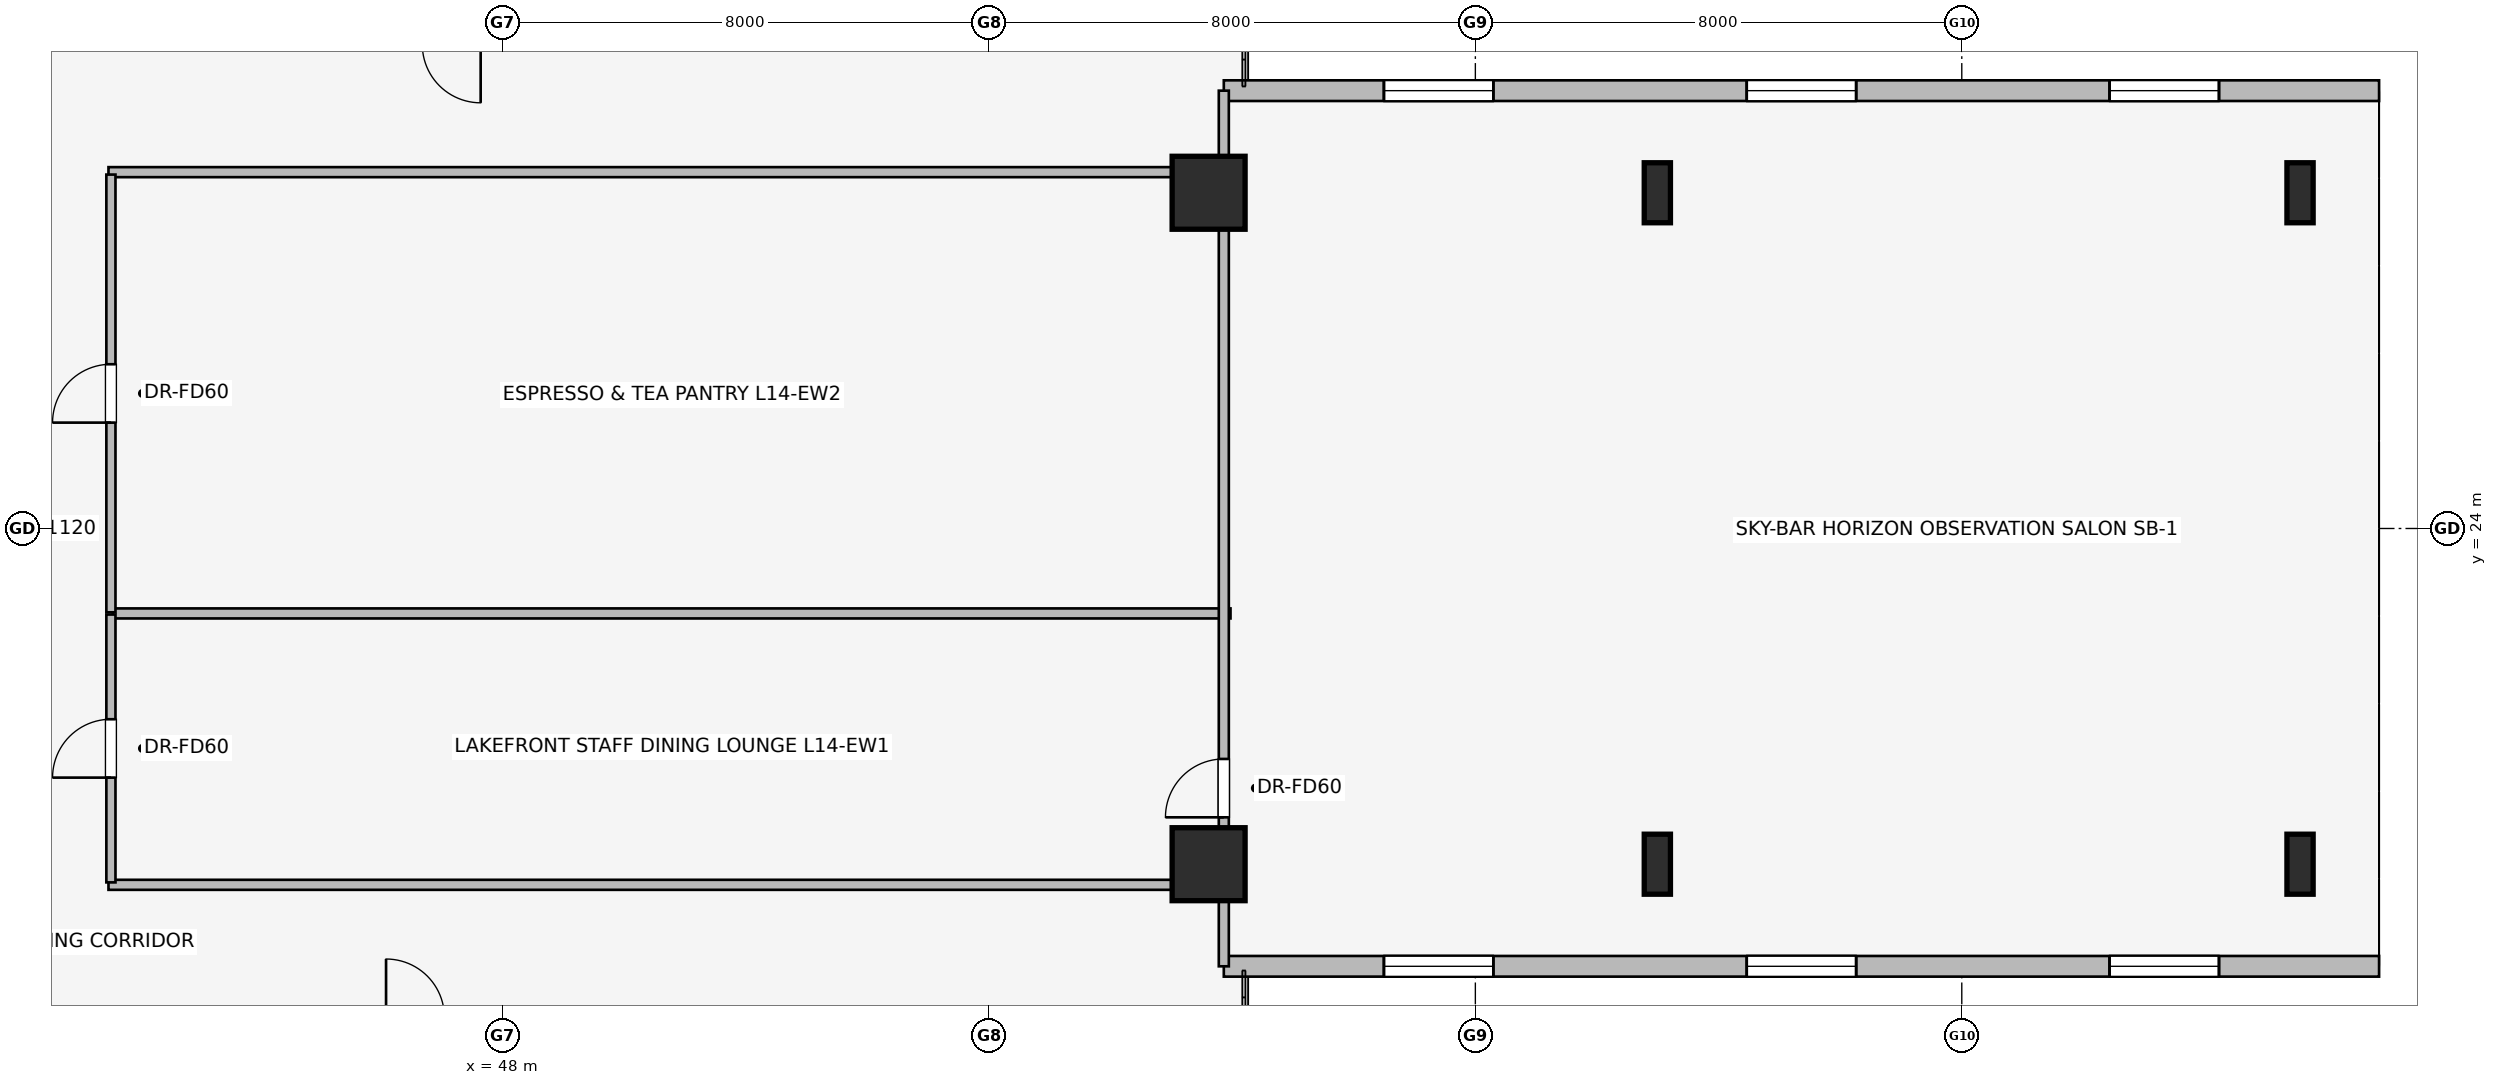
"""IFC4 building model, lengths in metres.
Left out: names, types, materials, properties, quantities, classifications, styles, units other than length and angle.
Written with IfcOpenShell. Run it as: python <this file> out.ifc"""

import sys

from ifc_helpers import new_model, si_unit, direction, frame, frame_2d, origin, origin_2d, place, context, subcontext, project, spatial, rectangle, i_section, extrude, element, fill, save


model = new_model("IFC4")
c1 = context("Model", 3, precision=1e-05, world=origin(), true_north=direction((0.0, 1.0)))
c2 = subcontext(c1, "Body", "Model", "MODEL_VIEW")
j1 = project(units=[si_unit("LENGTHUNIT", "METRE"), si_unit("PLANEANGLEUNIT", "RADIAN")], contexts=[c1])
p1 = place(None, origin())
s1 = spatial("IfcSite", under=j1, at=p1, CompositionType="ELEMENT")
p2 = place(p1, origin())
s2 = spatial("IfcBuilding", under=s1, at=p2, CompositionType="ELEMENT")
p3 = place(p2, frame((0.0, 0.0, 56.2)))
s3 = spatial("IfcBuildingStorey", under=s2, at=p3, CompositionType="ELEMENT", Elevation=56.2)
for number, where, z_axis, x_axis in (
    (1, (59.613, 18.479, 0.0), (0.0, 0.0, 1.0), (1.0, 0.0, 0.0)),
    (2, (59.613, 29.521, 0.0), (0.0, 0.0, 1.0), (1.0, 0.0, 0.0)),
):
    element("IfcColumn", number, at=place(p3, frame(where, z_axis=z_axis, x_axis=x_axis)), inside=s3, PredefinedType="COLUMN", context=c2, shape_type="SweptSolid", body=[
        extrude(rectangle(XDim=1.2, YDim=1.2, at=origin_2d()), origin(), (0.0, 0.0, 1.0), 3.65),
    ])
for number, where, z_axis, x_axis in (
    (3, (66.993, 18.479, 0.0), (0.0, 0.0, 1.0), (1.0, 0.0, 0.0)),
    (4, (66.993, 29.521, 0.0), (0.0, 0.0, 1.0), (1.0, 0.0, 0.0)),
    (5, (77.563, 18.479, 0.0), (0.0, 0.0, 1.0), (1.0, 0.0, 0.0)),
    (6, (77.563, 29.521, 0.0), (0.0, 0.0, 1.0), (1.0, 0.0, 0.0)),
):
    element("IfcColumn", number, at=place(p3, frame(where, z_axis=z_axis, x_axis=x_axis)), inside=s3, PredefinedType="COLUMN", context=c2, shape_type="SweptSolid", body=[
        extrude(i_section(OverallWidth=0.431, OverallDepth=0.987, WebThickness=0.034, FlangeThickness=0.062, at=origin_2d()), origin(), (0.0, 0.0, 1.0), 3.65),
    ])
p4 = place(p3, frame((78.863, 16.8, 0.0), z_axis=(0.0, 0.0, 1.0), x_axis=(-1.0, 0.0, 0.0)))
e7 = element("IfcWall", 7, at=p4, inside=s3, PredefinedType="STANDARD", context=c2, shape_type="SweptSolid", body=[
    extrude(rectangle(XDim=19.0, YDim=0.34, at=frame_2d((9.5, 0.0))), origin(), (0.0, 0.0, 1.0), 3.36),
])
p5 = place(p4, frame((2.633, 0.0, 0.75)))
e8 = element("IfcOpeningElement", 8, at=p5, cuts=e7, PredefinedType="OPENING", context=c2, shape_type="SweptSolid", body=[
    extrude(rectangle(XDim=1.8, YDim=1.5, at=frame_2d((0.9, 0.75))), frame((0.0, 0.18, 0.0), z_axis=(0.0, -1.0, 0.0), x_axis=(1.0, 0.0, 0.0)), (0.0, 0.0, 1.0), 0.36),
])
p6 = place(p4, frame((8.6, 0.0, 0.75)))
e9 = element("IfcOpeningElement", 9, at=p6, cuts=e7, PredefinedType="OPENING", context=c2, shape_type="SweptSolid", body=[
    extrude(rectangle(XDim=1.8, YDim=1.5, at=frame_2d((0.9, 0.75))), frame((0.0, 0.18, 0.0), z_axis=(0.0, -1.0, 0.0), x_axis=(1.0, 0.0, 0.0)), (0.0, 0.0, 1.0), 0.36),
])
p7 = place(p4, frame((14.567, 0.0, 0.75)))
e10 = element("IfcOpeningElement", 10, at=p7, cuts=e7, PredefinedType="OPENING", context=c2, shape_type="SweptSolid", body=[
    extrude(rectangle(XDim=1.8, YDim=1.5, at=frame_2d((0.9, 0.75))), frame((0.0, 0.18, 0.0), z_axis=(0.0, -1.0, 0.0), x_axis=(1.0, 0.0, 0.0)), (0.0, 0.0, 1.0), 0.36),
])
p8 = place(p3, frame((59.863, 31.2, 0.0), z_axis=(0.0, 0.0, 1.0), x_axis=(1.0, 0.0, 0.0)))
e11 = element("IfcWall", 11, at=p8, inside=s3, PredefinedType="STANDARD", context=c2, shape_type="SweptSolid", body=[
    extrude(rectangle(XDim=19.0, YDim=0.34, at=frame_2d((9.5, 0.0))), origin(), (0.0, 0.0, 1.0), 3.36),
])
p9 = place(p8, frame((2.633, 0.0, 0.75)))
e12 = element("IfcOpeningElement", 12, at=p9, cuts=e11, PredefinedType="OPENING", context=c2, shape_type="SweptSolid", body=[
    extrude(rectangle(XDim=1.8, YDim=1.5, at=frame_2d((0.9, 0.75))), frame((0.0, 0.18, 0.0), z_axis=(0.0, -1.0, 0.0), x_axis=(1.0, 0.0, 0.0)), (0.0, 0.0, 1.0), 0.36),
])
p10 = place(p8, frame((8.6, 0.0, 0.75)))
e13 = element("IfcOpeningElement", 13, at=p10, cuts=e11, PredefinedType="OPENING", context=c2, shape_type="SweptSolid", body=[
    extrude(rectangle(XDim=1.8, YDim=1.5, at=frame_2d((0.9, 0.75))), frame((0.0, 0.18, 0.0), z_axis=(0.0, -1.0, 0.0), x_axis=(1.0, 0.0, 0.0)), (0.0, 0.0, 1.0), 0.36),
])
p11 = place(p8, frame((14.567, 0.0, 0.75)))
e14 = element("IfcOpeningElement", 14, at=p11, cuts=e11, PredefinedType="OPENING", context=c2, shape_type="SweptSolid", body=[
    extrude(rectangle(XDim=1.8, YDim=1.5, at=frame_2d((0.9, 0.75))), frame((0.0, 0.18, 0.0), z_axis=(0.0, -1.0, 0.0), x_axis=(1.0, 0.0, 0.0)), (0.0, 0.0, 1.0), 0.36),
])
for number, where, z_axis, x_axis in (
    (15, (41.52, 18.14, 0.0), (0.0, 0.0, 1.0), (1.0, 0.0, 0.0)),
    (16, (41.52, 29.86, 0.0), (0.0, 0.0, 1.0), (1.0, 0.0, 0.0)),
):
    element("IfcWall", number, at=place(p3, frame(where, z_axis=z_axis, x_axis=x_axis)), inside=s3, PredefinedType="PARTITIONING", context=c2, shape_type="SweptSolid", body=[
        extrude(rectangle(XDim=18.453, YDim=0.165, at=frame_2d((9.227, 0.0))), origin(), (0.0, 0.0, 1.0), 2.483),
    ])
p12 = place(p3, frame((41.59, 22.603, 0.0), z_axis=(0.0, 0.0, 1.0), x_axis=(1.0, 0.0, 0.0)))
e17 = element("IfcWall", 17, at=p12, inside=s3, PredefinedType="PARTITIONING", context=c2, shape_type="SweptSolid", body=[
    extrude(rectangle(XDim=18.383, YDim=0.165, at=frame_2d((9.191, 0.0))), origin(), (0.0, 0.0, 1.0), 2.897),
])
p13 = place(p3, frame((41.56, 18.18, 0.0), z_axis=(0.0, 0.0, 1.0), x_axis=(0.0, 1.0, 0.0)))
e18 = element("IfcWall", 18, at=p13, inside=s3, PredefinedType="PARTITIONING", context=c2, shape_type="SweptSolid", body=[
    extrude(rectangle(XDim=4.405, YDim=0.15, at=frame_2d((2.203, 0.0))), origin(), (0.0, 0.0, 1.0), 3.36),
])
p14 = place(p13, frame((1.723, 0.0, 0.0)))
e19 = element("IfcOpeningElement", 19, at=p14, cuts=e18, PredefinedType="OPENING", context=c2, shape_type="SweptSolid", body=[
    extrude(rectangle(XDim=0.96, YDim=2.0, at=frame_2d((0.48, 1.0))), frame((0.0, 0.085, 0.0), z_axis=(0.0, -1.0, 0.0), x_axis=(1.0, 0.0, 0.0)), (0.0, 0.0, 1.0), 0.17),
])
p15 = place(p3, frame((41.56, 22.621, 0.0), z_axis=(0.0, 0.0, 1.0), x_axis=(0.0, 1.0, 0.0)))
e20 = element("IfcWall", 20, at=p15, inside=s3, PredefinedType="PARTITIONING", context=c2, shape_type="SweptSolid", body=[
    extrude(rectangle(XDim=7.199, YDim=0.15, at=frame_2d((3.6, 0.0))), origin(), (0.0, 0.0, 1.0), 3.36),
])
p16 = place(p15, frame((3.12, 0.0, 0.0)))
e21 = element("IfcOpeningElement", 21, at=p16, cuts=e20, PredefinedType="OPENING", context=c2, shape_type="SweptSolid", body=[
    extrude(rectangle(XDim=0.96, YDim=2.0, at=frame_2d((0.48, 1.0))), frame((0.0, 0.085, 0.0), z_axis=(0.0, -1.0, 0.0), x_axis=(1.0, 0.0, 0.0)), (0.0, 0.0, 1.0), 0.17),
])
p17 = place(p3, frame((59.863, 16.8, 0.0), z_axis=(0.0, 0.0, 1.0), x_axis=(0.0, 1.0, 0.0)))
e22 = element("IfcWall", 22, at=p17, inside=s3, PredefinedType="PARTITIONING", context=c2, shape_type="SweptSolid", body=[
    extrude(rectangle(XDim=14.4, YDim=0.165, at=frame_2d((7.2, 0.0))), origin(), (0.0, 0.0, 1.0), 2.654),
])
p18 = place(p17, frame((2.45, 0.0, 0.0)))
e23 = element("IfcOpeningElement", 23, at=p18, cuts=e22, PredefinedType="OPENING", context=c2, shape_type="SweptSolid", body=[
    extrude(rectangle(XDim=0.96, YDim=2.0, at=frame_2d((0.48, 1.0))), frame((0.0, 0.093, 0.0), z_axis=(0.0, -1.0, 0.0), x_axis=(1.0, 0.0, 0.0)), (0.0, 0.0, 1.0), 0.185),
])
p19 = place(p5, origin())
e24 = element("IfcWindow", 24, at=p19, inside=s3, PartitioningType="SINGLE_PANEL", PredefinedType="WINDOW", context=c2, shape_type="SweptSolid", body=[
    extrude(rectangle(XDim=1.8, YDim=1.5, at=frame_2d((0.9, 0.75))), frame((0.0, 0.03, 0.0), z_axis=(0.0, -1.0, 0.0), x_axis=(1.0, 0.0, 0.0)), (0.0, 0.0, 1.0), 0.06),
])
fill(e8, e24)
p20 = place(p6, origin())
e25 = element("IfcWindow", 25, at=p20, inside=s3, PartitioningType="SINGLE_PANEL", PredefinedType="WINDOW", context=c2, shape_type="SweptSolid", body=[
    extrude(rectangle(XDim=1.8, YDim=1.5, at=frame_2d((0.9, 0.75))), frame((0.0, 0.03, 0.0), z_axis=(0.0, -1.0, 0.0), x_axis=(1.0, 0.0, 0.0)), (0.0, 0.0, 1.0), 0.06),
])
fill(e9, e25)
p21 = place(p7, origin())
e26 = element("IfcWindow", 26, at=p21, inside=s3, PartitioningType="SINGLE_PANEL", PredefinedType="WINDOW", context=c2, shape_type="SweptSolid", body=[
    extrude(rectangle(XDim=1.8, YDim=1.5, at=frame_2d((0.9, 0.75))), frame((0.0, 0.03, 0.0), z_axis=(0.0, -1.0, 0.0), x_axis=(1.0, 0.0, 0.0)), (0.0, 0.0, 1.0), 0.06),
])
fill(e10, e26)
p22 = place(p9, origin())
e27 = element("IfcWindow", 27, at=p22, inside=s3, PartitioningType="SINGLE_PANEL", PredefinedType="WINDOW", context=c2, shape_type="SweptSolid", body=[
    extrude(rectangle(XDim=1.8, YDim=1.5, at=frame_2d((0.9, 0.75))), frame((0.0, 0.03, 0.0), z_axis=(0.0, -1.0, 0.0), x_axis=(1.0, 0.0, 0.0)), (0.0, 0.0, 1.0), 0.06),
])
fill(e12, e27)
p23 = place(p10, origin())
e28 = element("IfcWindow", 28, at=p23, inside=s3, PartitioningType="SINGLE_PANEL", PredefinedType="WINDOW", context=c2, shape_type="SweptSolid", body=[
    extrude(rectangle(XDim=1.8, YDim=1.5, at=frame_2d((0.9, 0.75))), frame((0.0, 0.03, 0.0), z_axis=(0.0, -1.0, 0.0), x_axis=(1.0, 0.0, 0.0)), (0.0, 0.0, 1.0), 0.06),
])
fill(e13, e28)
p24 = place(p11, origin())
e29 = element("IfcWindow", 29, at=p24, inside=s3, PartitioningType="SINGLE_PANEL", PredefinedType="WINDOW", context=c2, shape_type="SweptSolid", body=[
    extrude(rectangle(XDim=1.8, YDim=1.5, at=frame_2d((0.9, 0.75))), frame((0.0, 0.03, 0.0), z_axis=(0.0, -1.0, 0.0), x_axis=(1.0, 0.0, 0.0)), (0.0, 0.0, 1.0), 0.06),
])
fill(e14, e29)
p25 = place(p14, origin())
e30 = element("IfcDoor", 30, at=p25, inside=s3, OperationType="SINGLE_SWING_LEFT", PredefinedType="DOOR", context=c2, shape_type="SweptSolid", body=[
    extrude(rectangle(XDim=0.96, YDim=2.0, at=frame_2d((0.48, 1.0))), frame((0.0, 0.025, 0.0), z_axis=(0.0, -1.0, 0.0), x_axis=(1.0, 0.0, 0.0)), (0.0, 0.0, 1.0), 0.05),
])
fill(e19, e30)
p26 = place(p16, origin())
e31 = element("IfcDoor", 31, at=p26, inside=s3, OperationType="SINGLE_SWING_LEFT", PredefinedType="DOOR", context=c2, shape_type="SweptSolid", body=[
    extrude(rectangle(XDim=0.96, YDim=2.0, at=frame_2d((0.48, 1.0))), frame((0.0, 0.025, 0.0), z_axis=(0.0, -1.0, 0.0), x_axis=(1.0, 0.0, 0.0)), (0.0, 0.0, 1.0), 0.05),
])
fill(e21, e31)
p27 = place(p18, origin())
e32 = element("IfcDoor", 32, at=p27, inside=s3, OperationType="SINGLE_SWING_LEFT", PredefinedType="DOOR", context=c2, shape_type="SweptSolid", body=[
    extrude(rectangle(XDim=0.96, YDim=2.0, at=frame_2d((0.48, 1.0))), frame((0.0, 0.025, 0.0), z_axis=(0.0, -1.0, 0.0), x_axis=(1.0, 0.0, 0.0)), (0.0, 0.0, 1.0), 0.05),
])
fill(e23, e32)
save(model, sys.argv[1])
